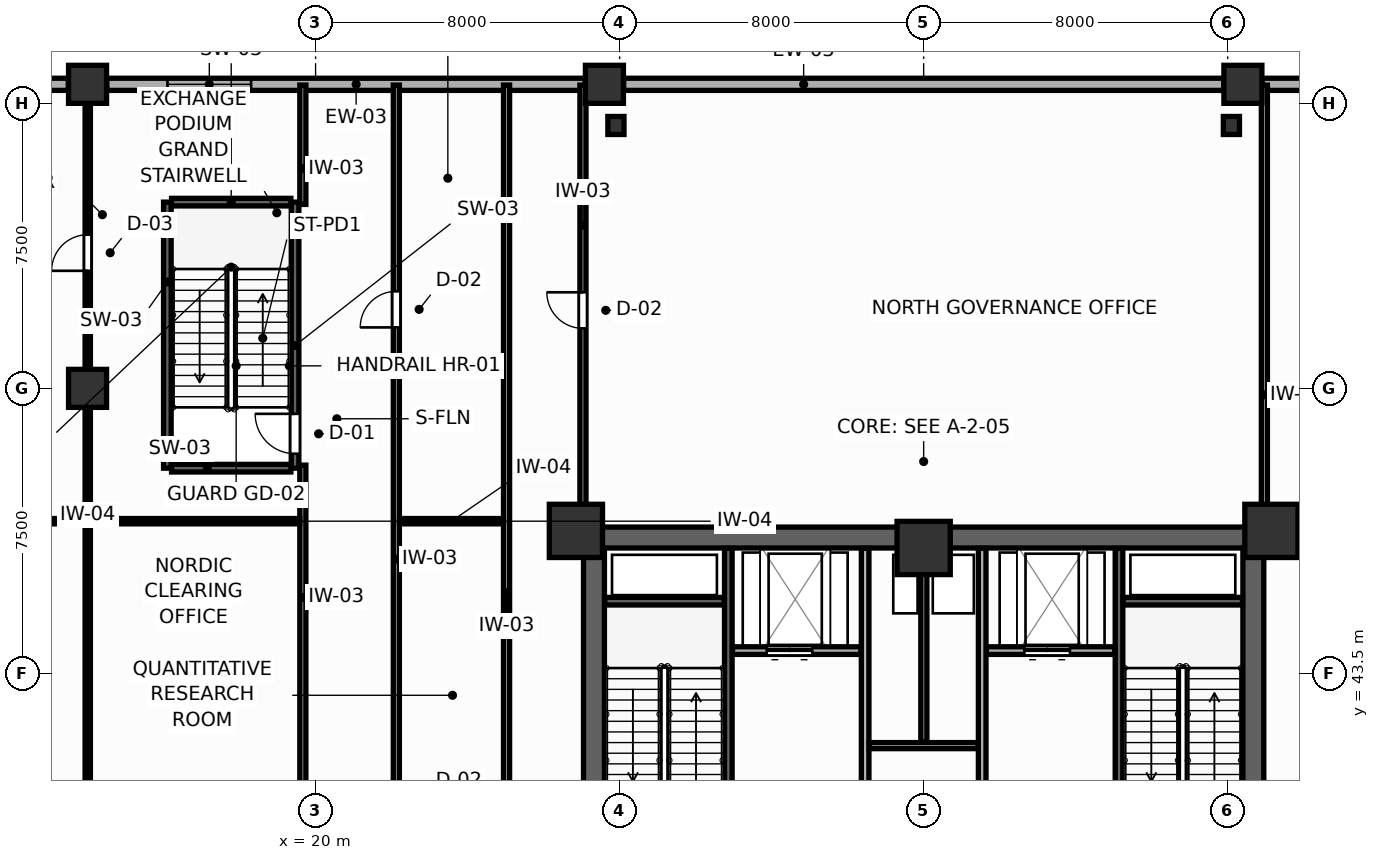
"""IFC4 building model, lengths in metres.
Left out: names, types, materials, properties, quantities, classifications, styles, units other than length and angle.
Written with IfcOpenShell. Run it as: python <this file> out.ifc"""

import sys

from ifc_helpers import new_model, si_unit, direction, frame, frame_2d, origin, origin_2d, place, context, subcontext, project, spatial, rectangle, i_section, extrude, source, transform, mapped, element, fill, save


model = new_model("IFC4")
c1 = context("Model", 3, precision=1e-05, world=origin(), true_north=direction((0.0, 1.0)))
c2 = subcontext(c1, "Body", "Model", "MODEL_VIEW")
j1 = project(units=[si_unit("LENGTHUNIT", "METRE"), si_unit("PLANEANGLEUNIT", "RADIAN")], contexts=[c1])
p1 = place(None, origin())
s1 = spatial("IfcSite", under=j1, at=p1, CompositionType="ELEMENT")
p2 = place(p1, origin())
s2 = spatial("IfcBuilding", under=s1, at=p2, CompositionType="ELEMENT")
p3 = place(p2, frame((0.0, 0.0, 9.6)))
s3 = spatial("IfcBuildingStorey", under=s2, at=p3, CompositionType="ELEMENT", Elevation=9.6)
p4 = place(p3, frame((27.05, 47.075, 0.0), z_axis=(0.0, 0.0, 1.0), x_axis=(1.0, 0.0, 0.0)))
e1 = element("IfcWall", 1, at=p4, inside=s3, PredefinedType="SHEAR", context=c2, shape_type="SweptSolid", body=[
    extrude(rectangle(XDim=17.9, YDim=0.55, at=frame_2d((8.95, 0.0))), origin(), (0.0, 0.0, 1.0), 4.8),
])
for number, where, z_axis, x_axis in (
    (2, (27.325, 37.8, 0.0), (0.0, 0.0, 1.0), (0.0, 1.0, 0.0)),
    (3, (44.675, 37.8, 0.0), (0.0, 0.0, 1.0), (0.0, 1.0, 0.0)),
):
    element("IfcWall", number, at=place(p3, frame(where, z_axis=z_axis, x_axis=x_axis)), inside=s3, PredefinedType="SHEAR", context=c2, shape_type="SweptSolid", body=[
        extrude(rectangle(XDim=9.0, YDim=0.55, at=frame_2d((4.5, 0.0))), origin(), (0.0, 0.0, 1.0), 4.8),
    ])
m1 = source(origin(), c2, "Body", "SweptSolid", [
    extrude(rectangle(XDim=1.4, YDim=1.4, at=origin_2d()), origin(), (0.0, 0.0, 1.0), 4.8),
])
for number, where, z_axis, x_axis in (
    (4, (26.85, 47.25, 0.0), (0.0, 0.0, 1.0), (1.0, 0.0, 0.0)),
    (5, (45.15, 47.25, 0.0), (0.0, 0.0, 1.0), (1.0, 0.0, 0.0)),
    (6, (36.0, 46.8, 0.0), (0.0, 0.0, 1.0), (1.0, 0.0, 0.0)),
):
    element("IfcColumn", number, at=place(p3, frame(where, z_axis=z_axis, x_axis=x_axis)), inside=s3, PredefinedType="COLUMN", context=c2, shape_type="MappedRepresentation", body=[
        mapped(m1, transform((0.0, 0.0, 0.0), scale=1.0)),
    ])
m2 = source(origin(), c2, "Body", "SweptSolid", [
    extrude(rectangle(XDim=1.0, YDim=1.0, at=origin_2d()), origin(), (0.0, 0.0, 1.0), 4.8),
])
for number, where, z_axis, x_axis in (
    (7, (14.0, 59.0, 0.0), (0.0, 0.0, 1.0), (1.0, 0.0, 0.0)),
    (8, (27.6, 59.0, 0.0), (0.0, 0.0, 1.0), (1.0, 0.0, 0.0)),
    (9, (44.4, 59.0, 0.0), (0.0, 0.0, 1.0), (1.0, 0.0, 0.0)),
    (10, (14.0, 51.0, 0.0), (0.0, 0.0, 1.0), (1.0, 0.0, 0.0)),
):
    element("IfcColumn", number, at=place(p3, frame(where, z_axis=z_axis, x_axis=x_axis)), inside=s3, PredefinedType="COLUMN", context=c2, shape_type="MappedRepresentation", body=[
        mapped(m2, transform((0.0, 0.0, 0.0), scale=1.0)),
    ])
m3 = source(origin(), c2, "Body", "SweptSolid", [
    extrude(i_section(OverallWidth=0.424, OverallDepth=0.474, WebThickness=0.045, FlangeThickness=0.072, FilletRadius=0.015, at=origin_2d()), origin(), (0.0, 0.0, 1.0), 4.8),
])
for number, where, z_axis, x_axis in (
    (11, (44.097, 57.917, 0.0), (0.0, 0.0, 1.0), (1.0, 0.0, 0.0)),
    (12, (27.903, 57.917, 0.0), (0.0, 0.0, 1.0), (1.0, 0.0, 0.0)),
):
    element("IfcColumn", number, at=place(p3, frame(where, z_axis=z_axis, x_axis=x_axis)), inside=s3, PredefinedType="COLUMN", context=c2, shape_type="MappedRepresentation", body=[
        mapped(m3, transform((0.0, 0.0, 0.0), scale=1.0)),
    ])
p5 = place(p3, frame((6.505, 59.0, 0.0), z_axis=(0.0, 0.0, 1.0), x_axis=(1.0, 0.0, 0.0)))
e13 = element("IfcWall", 13, at=p5, inside=s3, PredefinedType="SOLIDWALL", context=c2, shape_type="SweptSolid", body=[
    extrude(rectangle(XDim=6.99, YDim=0.32, at=frame_2d((3.495, 0.0))), origin(), (0.0, 0.0, 1.0), 3.65),
])
p6 = place(p5, frame((2.395, 0.0, 0.75)))
e14 = element("IfcOpeningElement", 14, at=p6, cuts=e13, PredefinedType="OPENING", context=c2, shape_type="SweptSolid", body=[
    extrude(rectangle(XDim=2.2, YDim=2.0, at=frame_2d((1.1, 1.0))), frame((0.0, 0.17, 0.0), z_axis=(0.0, -1.0, 0.0), x_axis=(1.0, 0.0, 0.0)), (0.0, 0.0, 1.0), 0.34),
])
p7 = place(p3, frame((14.505, 59.0, 0.0), z_axis=(0.0, 0.0, 1.0), x_axis=(1.0, 0.0, 0.0)))
e15 = element("IfcWall", 15, at=p7, inside=s3, PredefinedType="SOLIDWALL", context=c2, shape_type="SweptSolid", body=[
    extrude(rectangle(XDim=12.59, YDim=0.32, at=frame_2d((6.295, 0.0))), origin(), (0.0, 0.0, 1.0), 3.65),
])
p8 = place(p7, frame((1.599, 0.0, 0.75)))
e16 = element("IfcOpeningElement", 16, at=p8, cuts=e15, PredefinedType="OPENING", context=c2, shape_type="SweptSolid", body=[
    extrude(rectangle(XDim=2.2, YDim=2.0, at=frame_2d((1.1, 1.0))), frame((0.0, 0.17, 0.0), z_axis=(0.0, -1.0, 0.0), x_axis=(1.0, 0.0, 0.0)), (0.0, 0.0, 1.0), 0.34),
])
p9 = place(p3, frame((28.105, 59.0, 0.0), z_axis=(0.0, 0.0, 1.0), x_axis=(1.0, 0.0, 0.0)))
e17 = element("IfcWall", 17, at=p9, inside=s3, PredefinedType="SOLIDWALL", context=c2, shape_type="SweptSolid", body=[
    extrude(rectangle(XDim=15.79, YDim=0.32, at=frame_2d((7.895, 0.0))), origin(), (0.0, 0.0, 1.0), 3.65),
])
p10 = place(p3, frame((44.905, 59.0, 0.0), z_axis=(0.0, 0.0, 1.0), x_axis=(1.0, 0.0, 0.0)))
e18 = element("IfcWall", 18, at=p10, inside=s3, PredefinedType="SOLIDWALL", context=c2, shape_type="SweptSolid", body=[
    extrude(rectangle(XDim=12.59, YDim=0.32, at=frame_2d((6.295, 0.0))), origin(), (0.0, 0.0, 1.0), 3.65),
])
p11 = place(p10, frame((5.195, 0.0, 0.75)))
e19 = element("IfcOpeningElement", 19, at=p11, cuts=e18, PredefinedType="OPENING", context=c2, shape_type="SweptSolid", body=[
    extrude(rectangle(XDim=2.2, YDim=2.0, at=frame_2d((1.1, 1.0))), frame((0.0, 0.17, 0.0), z_axis=(0.0, -1.0, 0.0), x_axis=(1.0, 0.0, 0.0)), (0.0, 0.0, 1.0), 0.34),
])
p12 = place(p3, frame((30.86, 37.81, 0.0), z_axis=(0.0, 0.0, 1.0), x_axis=(0.0, 1.0, 0.0)))
e20 = element("IfcWall", 20, at=p12, inside=s3, PredefinedType="SHEAR", context=c2, shape_type="SweptSolid", body=[
    extrude(rectangle(XDim=8.98, YDim=0.2, at=frame_2d((4.49, 0.0))), origin(), (0.0, 0.0, 1.0), 4.8),
])
p13 = place(p12, frame((0.82, 0.0, 0.0)))
e21 = element("IfcOpeningElement", 21, at=p13, cuts=e20, PredefinedType="OPENING", context=c2, shape_type="SweptSolid", body=[
    extrude(rectangle(XDim=1.05, YDim=2.1, at=frame_2d((0.525, 1.05))), frame((0.0, 0.11, 0.0), z_axis=(0.0, -1.0, 0.0), x_axis=(1.0, 0.0, 0.0)), (0.0, 0.0, 1.0), 0.22),
])
p14 = place(p3, frame((27.61, 45.4, 0.0), z_axis=(0.0, 0.0, 1.0), x_axis=(1.0, 0.0, 0.0)))
e22 = element("IfcWall", 22, at=p14, inside=s3, PredefinedType="SHEAR", context=c2, shape_type="SweptSolid", body=[
    extrude(rectangle(XDim=3.14, YDim=0.2, at=frame_2d((1.57, 0.0))), origin(), (0.0, 0.0, 1.0), 4.8),
])
p15 = place(p3, frame((41.14, 37.81, 0.0), z_axis=(0.0, 0.0, 1.0), x_axis=(0.0, 1.0, 0.0)))
e23 = element("IfcWall", 23, at=p15, inside=s3, PredefinedType="SHEAR", context=c2, shape_type="SweptSolid", body=[
    extrude(rectangle(XDim=8.98, YDim=0.2, at=frame_2d((4.49, 0.0))), origin(), (0.0, 0.0, 1.0), 4.8),
])
p16 = place(p15, frame((0.82, 0.0, 0.0)))
e24 = element("IfcOpeningElement", 24, at=p16, cuts=e23, PredefinedType="OPENING", context=c2, shape_type="SweptSolid", body=[
    extrude(rectangle(XDim=1.05, YDim=2.1, at=frame_2d((0.525, 1.05))), frame((0.0, 0.11, 0.0), z_axis=(0.0, -1.0, 0.0), x_axis=(1.0, 0.0, 0.0)), (0.0, 0.0, 1.0), 0.22),
])
p17 = place(p3, frame((41.25, 45.4, 0.0), z_axis=(0.0, 0.0, 1.0), x_axis=(1.0, 0.0, 0.0)))
e25 = element("IfcWall", 25, at=p17, inside=s3, PredefinedType="SHEAR", context=c2, shape_type="SweptSolid", body=[
    extrude(rectangle(XDim=3.14, YDim=0.2, at=frame_2d((1.57, 0.0))), origin(), (0.0, 0.0, 1.0), 4.8),
])
p18 = place(p3, frame((30.97, 44.1, 0.0), z_axis=(0.0, 0.0, 1.0), x_axis=(1.0, 0.0, 0.0)))
e26 = element("IfcWall", 26, at=p18, inside=s3, PredefinedType="PARTITIONING", context=c2, shape_type="SweptSolid", body=[
    extrude(rectangle(XDim=3.38, YDim=0.2, at=frame_2d((1.69, 0.0))), origin(), (0.0, 0.0, 1.0), 4.35),
])
p19 = place(p18, frame((0.9, 0.0, 0.0)))
e27 = element("IfcOpeningElement", 27, at=p19, cuts=e26, PredefinedType="OPENING", context=c2, shape_type="SweptSolid", body=[
    extrude(rectangle(XDim=1.2, YDim=2.1, at=frame_2d((0.6, 1.05))), frame((0.0, 0.11, 0.0), z_axis=(0.0, -1.0, 0.0), x_axis=(1.0, 0.0, 0.0)), (0.0, 0.0, 1.0), 0.22),
])
p20 = place(p3, frame((37.65, 44.1, 0.0), z_axis=(0.0, 0.0, 1.0), x_axis=(1.0, 0.0, 0.0)))
e28 = element("IfcWall", 28, at=p20, inside=s3, PredefinedType="PARTITIONING", context=c2, shape_type="SweptSolid", body=[
    extrude(rectangle(XDim=3.38, YDim=0.2, at=frame_2d((1.69, 0.0))), origin(), (0.0, 0.0, 1.0), 4.35),
])
p21 = place(p20, frame((1.0, 0.0, 0.0)))
e29 = element("IfcOpeningElement", 29, at=p21, cuts=e28, PredefinedType="OPENING", context=c2, shape_type="SweptSolid", body=[
    extrude(rectangle(XDim=1.2, YDim=2.1, at=frame_2d((0.6, 1.05))), frame((0.0, 0.11, 0.0), z_axis=(0.0, -1.0, 0.0), x_axis=(1.0, 0.0, 0.0)), (0.0, 0.0, 1.0), 0.22),
])
p22 = place(p3, frame((34.46, 37.81, 0.0), z_axis=(0.0, 0.0, 1.0), x_axis=(0.0, 1.0, 0.0)))
e30 = element("IfcWall", 30, at=p22, inside=s3, PredefinedType="PARTITIONING", context=c2, shape_type="SweptSolid", body=[
    extrude(rectangle(XDim=8.98, YDim=0.2, at=frame_2d((4.49, 0.0))), origin(), (0.0, 0.0, 1.0), 4.35),
])
p23 = place(p22, frame((0.65, 0.0, 0.0)))
e31 = element("IfcOpeningElement", 31, at=p23, cuts=e30, PredefinedType="OPENING", context=c2, shape_type="SweptSolid", body=[
    extrude(rectangle(XDim=0.85, YDim=2.05, at=frame_2d((0.425, 1.025))), frame((0.0, 0.11, 0.0), z_axis=(0.0, -1.0, 0.0), x_axis=(1.0, 0.0, 0.0)), (0.0, 0.0, 1.0), 0.22),
])
p24 = place(p3, frame((37.54, 37.81, 0.0), z_axis=(0.0, 0.0, 1.0), x_axis=(0.0, 1.0, 0.0)))
e32 = element("IfcWall", 32, at=p24, inside=s3, PredefinedType="PARTITIONING", context=c2, shape_type="SweptSolid", body=[
    extrude(rectangle(XDim=8.98, YDim=0.2, at=frame_2d((4.49, 0.0))), origin(), (0.0, 0.0, 1.0), 4.35),
])
p25 = place(p24, frame((0.65, 0.0, 0.0)))
e33 = element("IfcOpeningElement", 33, at=p25, cuts=e32, PredefinedType="OPENING", context=c2, shape_type="SweptSolid", body=[
    extrude(rectangle(XDim=0.85, YDim=2.05, at=frame_2d((0.425, 1.025))), frame((0.0, 0.11, 0.0), z_axis=(0.0, -1.0, 0.0), x_axis=(1.0, 0.0, 0.0)), (0.0, 0.0, 1.0), 0.22),
])
p26 = place(p3, frame((34.57, 41.6, 0.0), z_axis=(0.0, 0.0, 1.0), x_axis=(1.0, 0.0, 0.0)))
e34 = element("IfcWall", 34, at=p26, inside=s3, PredefinedType="PARTITIONING", context=c2, shape_type="SweptSolid", body=[
    extrude(rectangle(XDim=2.86, YDim=0.16, at=frame_2d((1.43, 0.0))), origin(), (0.0, 0.0, 1.0), 4.35),
])
p27 = place(p3, frame((36.005, 41.69, 0.0), z_axis=(0.0, 0.0, 1.0), x_axis=(0.0, 1.0, 0.0)))
e35 = element("IfcWall", 35, at=p27, inside=s3, PredefinedType="PARTITIONING", context=c2, shape_type="SweptSolid", body=[
    extrude(rectangle(XDim=5.1, YDim=0.16, at=frame_2d((2.55, 0.0))), origin(), (0.0, 0.0, 1.0), 4.35),
])
p28 = place(p3, frame((19.46, 48.9, 0.0), z_axis=(0.0, 0.0, 1.0), x_axis=(0.0, 1.0, 0.0)))
e36 = element("IfcWall", 36, at=p28, inside=s3, PredefinedType="SHEAR", context=c2, shape_type="SweptSolid", body=[
    extrude(rectangle(XDim=7.0, YDim=0.2, at=frame_2d((3.5, 0.0))), origin(), (0.0, 0.0, 1.0), 4.8),
])
p29 = place(p28, frame((0.38, 0.0, 0.0)))
e37 = element("IfcOpeningElement", 37, at=p29, cuts=e36, PredefinedType="OPENING", context=c2, shape_type="SweptSolid", body=[
    extrude(rectangle(XDim=1.05, YDim=2.1, at=frame_2d((0.525, 1.05))), frame((0.0, 0.11, 0.0), z_axis=(0.0, -1.0, 0.0), x_axis=(1.0, 0.0, 0.0)), (0.0, 0.0, 1.0), 0.22),
])
p30 = place(p3, frame((16.1, 48.9, 0.0), z_axis=(0.0, 0.0, 1.0), x_axis=(0.0, 1.0, 0.0)))
e38 = element("IfcWall", 38, at=p30, inside=s3, PredefinedType="SHEAR", context=c2, shape_type="SweptSolid", body=[
    extrude(rectangle(XDim=7.0, YDim=0.2, at=frame_2d((3.5, 0.0))), origin(), (0.0, 0.0, 1.0), 4.8),
])
for number, where, z_axis, x_axis in (
    (39, (16.21, 55.9, 0.0), (0.0, 0.0, 1.0), (1.0, 0.0, 0.0)),
    (40, (16.21, 48.9, 0.0), (0.0, 0.0, 1.0), (1.0, 0.0, 0.0)),
):
    element("IfcWall", number, at=place(p3, frame(where, z_axis=z_axis, x_axis=x_axis)), inside=s3, PredefinedType="SHEAR", context=c2, shape_type="SweptSolid", body=[
        extrude(rectangle(XDim=3.14, YDim=0.2, at=frame_2d((1.57, 0.0))), origin(), (0.0, 0.0, 1.0), 4.8),
    ])
p31 = place(p3, frame((22.125, 32.27, 0.0), z_axis=(0.0, 0.0, 1.0), x_axis=(0.0, 1.0, 0.0)))
e41 = element("IfcWall", 41, at=p31, inside=s3, PredefinedType="PARTITIONING", context=c2, shape_type="SweptSolid", body=[
    extrude(rectangle(XDim=26.71, YDim=0.16, at=frame_2d((13.355, 0.0))), origin(), (0.0, 0.0, 1.0), 4.35),
])
p32 = place(p31, frame((7.195, 0.0, 0.0)))
e42 = element("IfcOpeningElement", 42, at=p32, cuts=e41, PredefinedType="OPENING", context=c2, shape_type="SweptSolid", body=[
    extrude(rectangle(XDim=0.95, YDim=2.05, at=frame_2d((0.475, 1.025))), frame((0.0, 0.09, 0.0), z_axis=(0.0, -1.0, 0.0), x_axis=(1.0, 0.0, 0.0)), (0.0, 0.0, 1.0), 0.18),
])
p33 = place(p31, frame((20.333, 0.0, 0.0)))
e43 = element("IfcOpeningElement", 43, at=p33, cuts=e41, PredefinedType="OPENING", context=c2, shape_type="SweptSolid", body=[
    extrude(rectangle(XDim=0.95, YDim=2.05, at=frame_2d((0.475, 1.025))), frame((0.0, 0.09, 0.0), z_axis=(0.0, -1.0, 0.0), x_axis=(1.0, 0.0, 0.0)), (0.0, 0.0, 1.0), 0.18),
])
p34 = place(p3, frame((25.025, 32.27, 0.0), z_axis=(0.0, 0.0, 1.0), x_axis=(0.0, 1.0, 0.0)))
e44 = element("IfcWall", 44, at=p34, inside=s3, PredefinedType="PARTITIONING", context=c2, shape_type="SweptSolid", body=[
    extrude(rectangle(XDim=26.71, YDim=0.16, at=frame_2d((13.355, 0.0))), origin(), (0.0, 0.0, 1.0), 4.35),
])
p35 = place(p3, frame((19.665, 32.27, 0.0), z_axis=(0.0, 0.0, 1.0), x_axis=(0.0, 1.0, 0.0)))
e45 = element("IfcWall", 45, at=p35, inside=s3, PredefinedType="PARTITIONING", context=c2, shape_type="SweptSolid", body=[
    extrude(rectangle(XDim=16.71, YDim=0.16, at=frame_2d((8.355, 0.0))), origin(), (0.0, 0.0, 1.0), 4.35),
])
p36 = place(p35, frame((3.972, 0.0, 0.0)))
e46 = element("IfcOpeningElement", 46, at=p36, cuts=e45, PredefinedType="OPENING", context=c2, shape_type="SweptSolid", body=[
    extrude(rectangle(XDim=0.95, YDim=2.05, at=frame_2d((0.475, 1.025))), frame((0.0, 0.09, 0.0), z_axis=(0.0, -1.0, 0.0), x_axis=(1.0, 0.0, 0.0)), (0.0, 0.0, 1.0), 0.18),
])
p37 = place(p3, frame((27.035, 47.34, 0.0), z_axis=(0.0, 0.0, 1.0), x_axis=(0.0, 1.0, 0.0)))
e47 = element("IfcWall", 47, at=p37, inside=s3, PredefinedType="PARTITIONING", context=c2, shape_type="SweptSolid", body=[
    extrude(rectangle(XDim=11.64, YDim=0.16, at=frame_2d((5.82, 0.0))), origin(), (0.0, 0.0, 1.0), 4.35),
])
p38 = place(p37, frame((5.238, 0.0, 0.0)))
e48 = element("IfcOpeningElement", 48, at=p38, cuts=e47, PredefinedType="OPENING", context=c2, shape_type="SweptSolid", body=[
    extrude(rectangle(XDim=0.95, YDim=2.05, at=frame_2d((0.475, 1.025))), frame((0.0, 0.09, 0.0), z_axis=(0.0, -1.0, 0.0), x_axis=(1.0, 0.0, 0.0)), (0.0, 0.0, 1.0), 0.18),
])
p39 = place(p3, frame((44.965, 47.34, 0.0), z_axis=(0.0, 0.0, 1.0), x_axis=(0.0, 1.0, 0.0)))
e49 = element("IfcWall", 49, at=p39, inside=s3, PredefinedType="PARTITIONING", context=c2, shape_type="SweptSolid", body=[
    extrude(rectangle(XDim=11.64, YDim=0.16, at=frame_2d((5.82, 0.0))), origin(), (0.0, 0.0, 1.0), 4.35),
])
p40 = place(p3, frame((19.665, 55.84, 0.0), z_axis=(0.0, 0.0, 1.0), x_axis=(0.0, 1.0, 0.0)))
e50 = element("IfcWall", 50, at=p40, inside=s3, PredefinedType="PARTITIONING", context=c2, shape_type="SweptSolid", body=[
    extrude(rectangle(XDim=3.14, YDim=0.16, at=frame_2d((1.57, 0.0))), origin(), (0.0, 0.0, 1.0), 4.35),
])
p41 = place(p3, frame((14.005, 36.035, 0.0), z_axis=(0.0, 0.0, 1.0), x_axis=(0.0, 1.0, 0.0)))
e51 = element("IfcWall", 51, at=p41, inside=s3, PredefinedType="PARTITIONING", context=c2, shape_type="SweptSolid", body=[
    extrude(rectangle(XDim=22.945, YDim=0.14, at=frame_2d((11.473, 0.0))), origin(), (0.0, 0.0, 1.0), 4.35),
])
p42 = place(p41, frame((18.058, 0.0, 0.0)))
e52 = element("IfcOpeningElement", 52, at=p42, cuts=e51, PredefinedType="OPENING", context=c2, shape_type="SweptSolid", body=[
    extrude(rectangle(XDim=0.95, YDim=2.05, at=frame_2d((0.475, 1.025))), frame((0.0, 0.08, 0.0), z_axis=(0.0, -1.0, 0.0), x_axis=(1.0, 0.0, 0.0)), (0.0, 0.0, 1.0), 0.16),
])
p43 = place(p3, frame((6.02, 47.505, 0.0), z_axis=(0.0, 0.0, 1.0), x_axis=(1.0, 0.0, 0.0)))
e53 = element("IfcWall", 53, at=p43, inside=s3, PredefinedType="PARTITIONING", context=c2, shape_type="SweptSolid", body=[
    extrude(rectangle(XDim=13.563, YDim=0.14, at=frame_2d((6.781, 0.0))), origin(), (0.0, 0.0, 1.0), 4.35),
])
p44 = place(p43, frame((3.465, 0.0, 0.0)))
e54 = element("IfcOpeningElement", 54, at=p44, cuts=e53, PredefinedType="OPENING", context=c2, shape_type="SweptSolid", body=[
    extrude(rectangle(XDim=0.95, YDim=2.05, at=frame_2d((0.475, 1.025))), frame((0.0, 0.08, 0.0), z_axis=(0.0, -1.0, 0.0), x_axis=(1.0, 0.0, 0.0)), (0.0, 0.0, 1.0), 0.16),
])
p45 = place(p3, frame((22.207, 47.505, 0.0), z_axis=(0.0, 0.0, 1.0), x_axis=(1.0, 0.0, 0.0)))
e55 = element("IfcWall", 55, at=p45, inside=s3, PredefinedType="PARTITIONING", context=c2, shape_type="SweptSolid", body=[
    extrude(rectangle(XDim=2.736, YDim=0.14, at=frame_2d((1.368, 0.0))), origin(), (0.0, 0.0, 1.0), 4.35),
])
p46 = place(p8, origin())
e56 = element("IfcWindow", 56, at=p46, inside=s3, PartitioningType="SINGLE_PANEL", PredefinedType="WINDOW", context=c2, shape_type="SweptSolid", body=[
    extrude(rectangle(XDim=2.2, YDim=2.0, at=frame_2d((1.1, 1.0))), frame((0.0, 0.03, 0.0), z_axis=(0.0, -1.0, 0.0), x_axis=(1.0, 0.0, 0.0)), (0.0, 0.0, 1.0), 0.06),
])
fill(e16, e56)
p47 = place(p19, origin())
e57 = element("IfcDoor", 57, at=p47, inside=s3, OperationType="DOUBLE_DOOR_SLIDING", PredefinedType="DOOR", context=c2, shape_type="SweptSolid", body=[
    extrude(rectangle(XDim=1.2, YDim=2.1, at=frame_2d((0.6, 1.05))), frame((0.0, 0.025, 0.0), z_axis=(0.0, -1.0, 0.0), x_axis=(1.0, 0.0, 0.0)), (0.0, 0.0, 1.0), 0.05),
])
fill(e27, e57)
p48 = place(p21, origin())
e58 = element("IfcDoor", 58, at=p48, inside=s3, OperationType="DOUBLE_DOOR_SLIDING", PredefinedType="DOOR", context=c2, shape_type="SweptSolid", body=[
    extrude(rectangle(XDim=1.2, YDim=2.1, at=frame_2d((0.6, 1.05))), frame((0.0, 0.025, 0.0), z_axis=(0.0, -1.0, 0.0), x_axis=(1.0, 0.0, 0.0)), (0.0, 0.0, 1.0), 0.05),
])
fill(e29, e58)
p49 = place(p29, origin())
e59 = element("IfcDoor", 59, at=p49, inside=s3, OperationType="SINGLE_SWING_RIGHT", PredefinedType="DOOR", context=c2, shape_type="SweptSolid", body=[
    extrude(rectangle(XDim=1.05, YDim=2.1, at=frame_2d((0.525, 1.05))), frame((0.0, 0.025, 0.0), z_axis=(0.0, -1.0, 0.0), x_axis=(1.0, 0.0, 0.0)), (0.0, 0.0, 1.0), 0.05),
])
fill(e37, e59)
p50 = place(p33, origin())
e60 = element("IfcDoor", 60, at=p50, inside=s3, OperationType="SINGLE_SWING_LEFT", PredefinedType="DOOR", context=c2, shape_type="SweptSolid", body=[
    extrude(rectangle(XDim=0.95, YDim=2.05, at=frame_2d((0.475, 1.025))), frame((0.0, 0.025, 0.0), z_axis=(0.0, -1.0, 0.0), x_axis=(1.0, 0.0, 0.0)), (0.0, 0.0, 1.0), 0.05),
])
fill(e43, e60)
p51 = place(p38, origin())
e61 = element("IfcDoor", 61, at=p51, inside=s3, OperationType="SINGLE_SWING_RIGHT", PredefinedType="DOOR", context=c2, shape_type="SweptSolid", body=[
    extrude(rectangle(XDim=0.95, YDim=2.05, at=frame_2d((0.475, 1.025))), frame((0.0, 0.025, 0.0), z_axis=(0.0, -1.0, 0.0), x_axis=(1.0, 0.0, 0.0)), (0.0, 0.0, 1.0), 0.05),
])
fill(e48, e61)
p52 = place(p42, origin())
e62 = element("IfcDoor", 62, at=p52, inside=s3, OperationType="SINGLE_SWING_LEFT", PredefinedType="DOOR", context=c2, shape_type="SweptSolid", body=[
    extrude(rectangle(XDim=0.95, YDim=2.05, at=frame_2d((0.475, 1.025))), frame((0.0, 0.025, 0.0), z_axis=(0.0, -1.0, 0.0), x_axis=(1.0, 0.0, 0.0)), (0.0, 0.0, 1.0), 0.05),
])
fill(e52, e62)
save(model, sys.argv[1])
